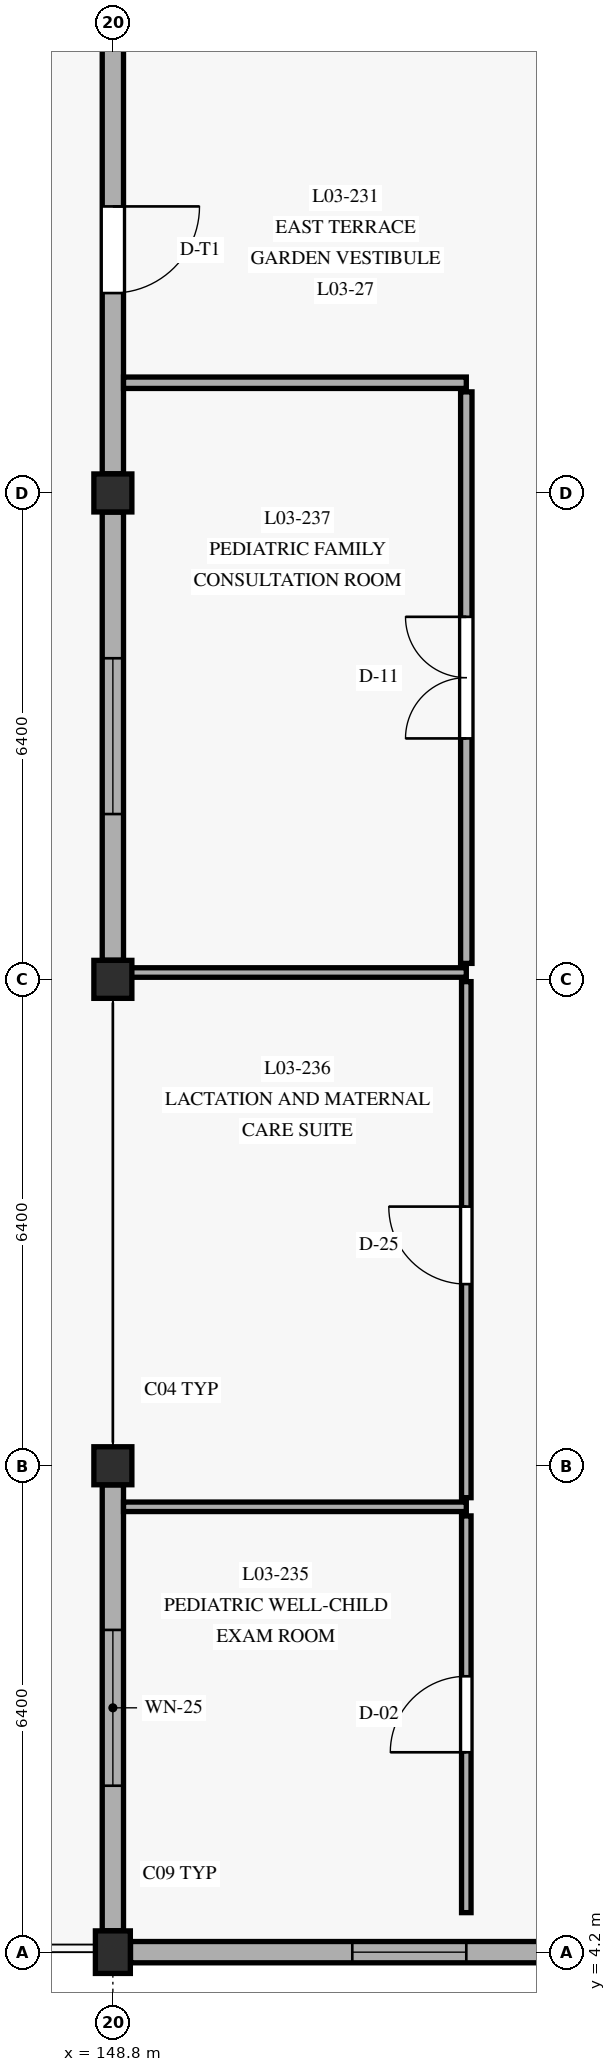
"""IFC4 building model, lengths in metres.
Left out: names, types, materials, properties, quantities, classifications, styles, units other than length and angle.
Written with IfcOpenShell. Run it as: python <this file> out.ifc"""

import sys

from ifc_helpers import new_model, si_unit, direction, frame, frame_2d, origin, origin_with_axes, origin_2d, place, context, subcontext, project, spatial, rectangle, extrude, element, fill, save


model = new_model("IFC4")
c1 = context("Model", 3, precision=1e-05, world=origin(), true_north=direction((0.0, 1.0)))
c2 = subcontext(c1, "Body", "Model", "MODEL_VIEW")
j1 = project(units=[si_unit("LENGTHUNIT", "METRE"), si_unit("PLANEANGLEUNIT", "RADIAN")], contexts=[c1])
p1 = place(None, origin())
s1 = spatial("IfcSite", under=j1, at=p1, CompositionType="ELEMENT")
p2 = place(p1, origin())
s2 = spatial("IfcBuilding", under=s1, at=p2, CompositionType="ELEMENT")
p3 = place(p2, frame((0.0, 0.0, 9.3)))
s3 = spatial("IfcBuildingStorey", under=s2, at=p3, CompositionType="ELEMENT", Elevation=9.3)
p4 = place(p3, frame((148.8, 4.2, 0.0), z_axis=(0.0, 0.0, 1.0), x_axis=(1.0, 0.0, 0.0)))
e1 = element("IfcColumn", 1, at=p4, inside=s3, PredefinedType="COLUMN", context=c2, shape_type="SweptSolid", body=[
    extrude(rectangle(XDim=0.46, YDim=0.56, at=origin_2d()), origin(), (0.0, 0.0, 1.0), 4.2),
])
for number, where, z_axis, x_axis in (
    (2, (148.8, 10.6, 0.0), (0.0, 0.0, 1.0), (1.0, 0.0, 0.0)),
    (3, (148.8, 17.0, 0.0), (0.0, 0.0, 1.0), (1.0, 0.0, 0.0)),
    (4, (148.8, 23.4, 0.0), (0.0, 0.0, 1.0), (1.0, 0.0, 0.0)),
):
    element("IfcColumn", number, at=place(p3, frame(where, z_axis=z_axis, x_axis=x_axis)), inside=s3, PredefinedType="COLUMN", context=c2, shape_type="SweptSolid", body=[
        extrude(rectangle(XDim=0.5, YDim=0.5, at=origin_2d()), origin(), (0.0, 0.0, 1.0), 4.2),
    ])
p5 = place(p3, frame((148.8, 10.348, 0.0), z_axis=(0.0, 0.0, 1.0), x_axis=(0.0, -1.0, 0.0)))
e5 = element("IfcWall", 5, at=p5, inside=s3, PredefinedType="SOLIDWALL", context=c2, shape_type="SweptSolid", body=[
    extrude(rectangle(XDim=5.866, YDim=0.28, at=frame_2d((2.933, 0.0))), origin(), (0.0, 0.0, 1.0), 3.57),
])
p6 = place(p5, frame((1.908, 0.0, 0.8)))
e6 = element("IfcOpeningElement", 6, at=p6, cuts=e5, PredefinedType="OPENING", context=c2, shape_type="SweptSolid", body=[
    extrude(rectangle(XDim=2.05, YDim=1.95, at=frame_2d((1.025, 0.975))), frame((0.0, 0.15, 0.0), z_axis=(0.0, -1.0, 0.0), x_axis=(1.0, 0.0, 0.0)), (0.0, 0.0, 1.0), 0.3),
])
p7 = place(p3, frame((148.8, 23.148, 0.0), z_axis=(0.0, 0.0, 1.0), x_axis=(0.0, -1.0, 0.0)))
e7 = element("IfcWall", 7, at=p7, inside=s3, PredefinedType="SOLIDWALL", context=c2, shape_type="SweptSolid", body=[
    extrude(rectangle(XDim=5.896, YDim=0.28, at=frame_2d((2.948, 0.0))), origin(), (0.0, 0.0, 1.0), 3.57),
])
p8 = place(p7, frame((1.923, 0.0, 0.8)))
e8 = element("IfcOpeningElement", 8, at=p8, cuts=e7, PredefinedType="OPENING", context=c2, shape_type="SweptSolid", body=[
    extrude(rectangle(XDim=2.05, YDim=1.95, at=frame_2d((1.025, 0.975))), frame((0.0, 0.15, 0.0), z_axis=(0.0, -1.0, 0.0), x_axis=(1.0, 0.0, 0.0)), (0.0, 0.0, 1.0), 0.3),
])
p9 = place(p3, frame((148.8, 29.548, 0.0), z_axis=(0.0, 0.0, 1.0), x_axis=(0.0, -1.0, 0.0)))
e9 = element("IfcWall", 9, at=p9, inside=s3, PredefinedType="SOLIDWALL", context=c2, shape_type="SweptSolid", body=[
    extrude(rectangle(XDim=5.896, YDim=0.28, at=frame_2d((2.948, 0.0))), origin(), (0.0, 0.0, 1.0), 3.57),
])
p10 = place(p9, frame((2.378, 0.0, 0.0)))
e10 = element("IfcOpeningElement", 10, at=p10, cuts=e9, PredefinedType="OPENING", context=c2, shape_type="SweptSolid", body=[
    extrude(rectangle(XDim=1.14, YDim=2.3, at=frame_2d((0.57, 1.15))), frame((0.0, 0.15, 0.0), z_axis=(0.0, -1.0, 0.0), x_axis=(1.0, 0.0, 0.0)), (0.0, 0.0, 1.0), 0.3),
])
p11 = place(p3, frame((149.032, 4.2, 0.0), z_axis=(0.0, 0.0, 1.0), x_axis=(1.0, 0.0, 0.0)))
e11 = element("IfcWall", 11, at=p11, inside=s3, PredefinedType="SOLIDWALL", context=c2, shape_type="SweptSolid", body=[
    extrude(rectangle(XDim=7.336, YDim=0.28, at=frame_2d((3.668, 0.0))), origin(), (0.0, 0.0, 1.0), 3.4),
])
p12 = place(p11, frame((2.918, 0.0, 0.9)))
e12 = element("IfcOpeningElement", 12, at=p12, cuts=e11, PredefinedType="OPENING", context=c2, shape_type="SweptSolid", body=[
    extrude(rectangle(XDim=1.5, YDim=2.2, at=frame_2d((0.75, 1.1))), frame((0.0, 0.15, 0.0), z_axis=(0.0, -1.0, 0.0), x_axis=(1.0, 0.0, 0.0)), (0.0, 0.0, 1.0), 0.3),
])
p13 = place(p3, frame((153.45, 4.72, 0.0), z_axis=(0.0, 0.0, 1.0), x_axis=(0.0, 1.0, 0.0)))
e13 = element("IfcWall", 13, at=p13, inside=s3, PredefinedType="PARTITIONING", context=c2, shape_type="SweptSolid", body=[
    extrude(rectangle(XDim=5.22, YDim=0.125, at=frame_2d((2.61, 0.0))), origin(), (0.0, 0.0, 1.0), 3.895),
])
p14 = place(p13, frame((2.11, 0.0, 0.0)))
e14 = element("IfcOpeningElement", 14, at=p14, cuts=e13, PredefinedType="OPENING", context=c2, shape_type="SweptSolid", body=[
    extrude(rectangle(XDim=1.0, YDim=2.15, at=frame_2d((0.5, 1.075))), frame((0.0, 0.073, 0.0), z_axis=(0.0, -1.0, 0.0), x_axis=(1.0, 0.0, 0.0)), (0.0, 0.0, 1.0), 0.145),
])
p15 = place(p3, frame((148.94, 10.06, 0.0), z_axis=(0.0, 0.0, 1.0), x_axis=(1.0, 0.0, 0.0)))
e15 = element("IfcWall", 15, at=p15, inside=s3, PredefinedType="PARTITIONING", context=c2, shape_type="SweptSolid", body=[
    extrude(rectangle(XDim=4.51, YDim=0.125, at=frame_2d((2.255, 0.0))), origin(), (0.0, 0.0, 1.0), 3.565),
])
p16 = place(p3, frame((153.45, 10.18, 0.0), z_axis=(0.0, 0.0, 1.0), x_axis=(0.0, 1.0, 0.0)))
e16 = element("IfcWall", 16, at=p16, inside=s3, PredefinedType="PARTITIONING", context=c2, shape_type="SweptSolid", body=[
    extrude(rectangle(XDim=6.79, YDim=0.125, at=frame_2d((3.395, 0.0))), origin(), (0.0, 0.0, 1.0), 3.495),
])
p17 = place(p16, frame((2.81, 0.0, 0.0)))
e17 = element("IfcOpeningElement", 17, at=p17, cuts=e16, PredefinedType="OPENING", context=c2, shape_type="SweptSolid", body=[
    extrude(rectangle(XDim=1.02, YDim=2.18, at=frame_2d((0.51, 1.09))), frame((0.0, 0.073, 0.0), z_axis=(0.0, -1.0, 0.0), x_axis=(1.0, 0.0, 0.0)), (0.0, 0.0, 1.0), 0.145),
])
p18 = place(p3, frame((148.94, 17.09, 0.0), z_axis=(0.0, 0.0, 1.0), x_axis=(1.0, 0.0, 0.0)))
e18 = element("IfcWall", 18, at=p18, inside=s3, PredefinedType="PARTITIONING", context=c2, shape_type="SweptSolid", body=[
    extrude(rectangle(XDim=4.51, YDim=0.125, at=frame_2d((2.255, 0.0))), origin(), (0.0, 0.0, 1.0), 3.495),
])
p19 = place(p3, frame((153.45, 17.21, 0.0), z_axis=(0.0, 0.0, 1.0), x_axis=(0.0, 1.0, 0.0)))
e19 = element("IfcWall", 19, at=p19, inside=s3, PredefinedType="PARTITIONING", context=c2, shape_type="SweptSolid", body=[
    extrude(rectangle(XDim=7.52, YDim=0.15, at=frame_2d((3.76, 0.0))), origin(), (0.0, 0.0, 1.0), 3.245),
])
p20 = place(p19, frame((2.96, 0.0, 0.0)))
e20 = element("IfcOpeningElement", 20, at=p20, cuts=e19, PredefinedType="OPENING", context=c2, shape_type="SweptSolid", body=[
    extrude(rectangle(XDim=1.6, YDim=2.25, at=frame_2d((0.8, 1.125))), frame((0.0, 0.085, 0.0), z_axis=(0.0, -1.0, 0.0), x_axis=(1.0, 0.0, 0.0)), (0.0, 0.0, 1.0), 0.17),
])
p21 = place(p3, frame((148.94, 24.85, 0.0), z_axis=(0.0, 0.0, 1.0), x_axis=(1.0, 0.0, 0.0)))
e21 = element("IfcWall", 21, at=p21, inside=s3, PredefinedType="PARTITIONING", context=c2, shape_type="SweptSolid", body=[
    extrude(rectangle(XDim=4.51, YDim=0.15, at=frame_2d((2.255, 0.0))), origin(), (0.0, 0.0, 1.0), 3.565),
])
p22 = place(p6, origin_with_axes())
e22 = element("IfcWindow", 22, at=p22, inside=s3, PartitioningType="SINGLE_PANEL", PredefinedType="WINDOW", context=c2, shape_type="SweptSolid", body=[
    extrude(rectangle(XDim=2.05, YDim=1.95, at=frame_2d((1.025, 0.975))), frame((0.0, 0.03, 0.0), z_axis=(0.0, -1.0, 0.0), x_axis=(1.0, 0.0, 0.0)), (0.0, 0.0, 1.0), 0.06),
])
fill(e6, e22)
p23 = place(p8, origin_with_axes())
e23 = element("IfcWindow", 23, at=p23, inside=s3, PartitioningType="SINGLE_PANEL", PredefinedType="WINDOW", context=c2, shape_type="SweptSolid", body=[
    extrude(rectangle(XDim=2.05, YDim=1.95, at=frame_2d((1.025, 0.975))), frame((0.0, 0.03, 0.0), z_axis=(0.0, -1.0, 0.0), x_axis=(1.0, 0.0, 0.0)), (0.0, 0.0, 1.0), 0.06),
])
fill(e8, e23)
p24 = place(p10, frame((1.14, 0.0, 0.0), z_axis=(0.0, 0.0, 1.0), x_axis=(-1.0, 0.0, 0.0)))
e24 = element("IfcDoor", 24, at=p24, inside=s3, OperationType="SINGLE_SWING_RIGHT", PredefinedType="DOOR", context=c2, shape_type="SweptSolid", body=[
    extrude(rectangle(XDim=1.14, YDim=2.3, at=frame_2d((0.57, 1.15))), frame((0.0, 0.025, 0.0), z_axis=(0.0, -1.0, 0.0), x_axis=(1.0, 0.0, 0.0)), (0.0, 0.0, 1.0), 0.05),
])
fill(e10, e24)
p25 = place(p12, origin_with_axes())
e25 = element("IfcWindow", 25, at=p25, inside=s3, PartitioningType="SINGLE_PANEL", PredefinedType="WINDOW", context=c2, shape_type="SweptSolid", body=[
    extrude(rectangle(XDim=1.5, YDim=2.2, at=frame_2d((0.75, 1.1))), frame((0.0, 0.03, 0.0), z_axis=(0.0, -1.0, 0.0), x_axis=(1.0, 0.0, 0.0)), (0.0, 0.0, 1.0), 0.06),
])
fill(e12, e25)
p26 = place(p14, origin_with_axes())
e26 = element("IfcDoor", 26, at=p26, inside=s3, OperationType="SINGLE_SWING_LEFT", PredefinedType="DOOR", context=c2, shape_type="SweptSolid", body=[
    extrude(rectangle(XDim=1.0, YDim=2.15, at=frame_2d((0.5, 1.075))), frame((0.0, 0.025, 0.0), z_axis=(0.0, -1.0, 0.0), x_axis=(1.0, 0.0, 0.0)), (0.0, 0.0, 1.0), 0.05),
])
fill(e14, e26)
p27 = place(p17, origin_with_axes())
e27 = element("IfcDoor", 27, at=p27, inside=s3, OperationType="SINGLE_SWING_RIGHT", PredefinedType="DOOR", context=c2, shape_type="SweptSolid", body=[
    extrude(rectangle(XDim=1.02, YDim=2.18, at=frame_2d((0.51, 1.09))), frame((0.0, 0.025, 0.0), z_axis=(0.0, -1.0, 0.0), x_axis=(1.0, 0.0, 0.0)), (0.0, 0.0, 1.0), 0.05),
])
fill(e17, e27)
p28 = place(p20, origin_with_axes())
e28 = element("IfcDoor", 28, at=p28, inside=s3, OperationType="DOUBLE_DOOR_SINGLE_SWING", PredefinedType="DOOR", context=c2, shape_type="SweptSolid", body=[
    extrude(rectangle(XDim=1.6, YDim=2.25, at=frame_2d((0.8, 1.125))), frame((0.0, 0.025, 0.0), z_axis=(0.0, -1.0, 0.0), x_axis=(1.0, 0.0, 0.0)), (0.0, 0.0, 1.0), 0.05),
])
fill(e20, e28)
save(model, sys.argv[1])
